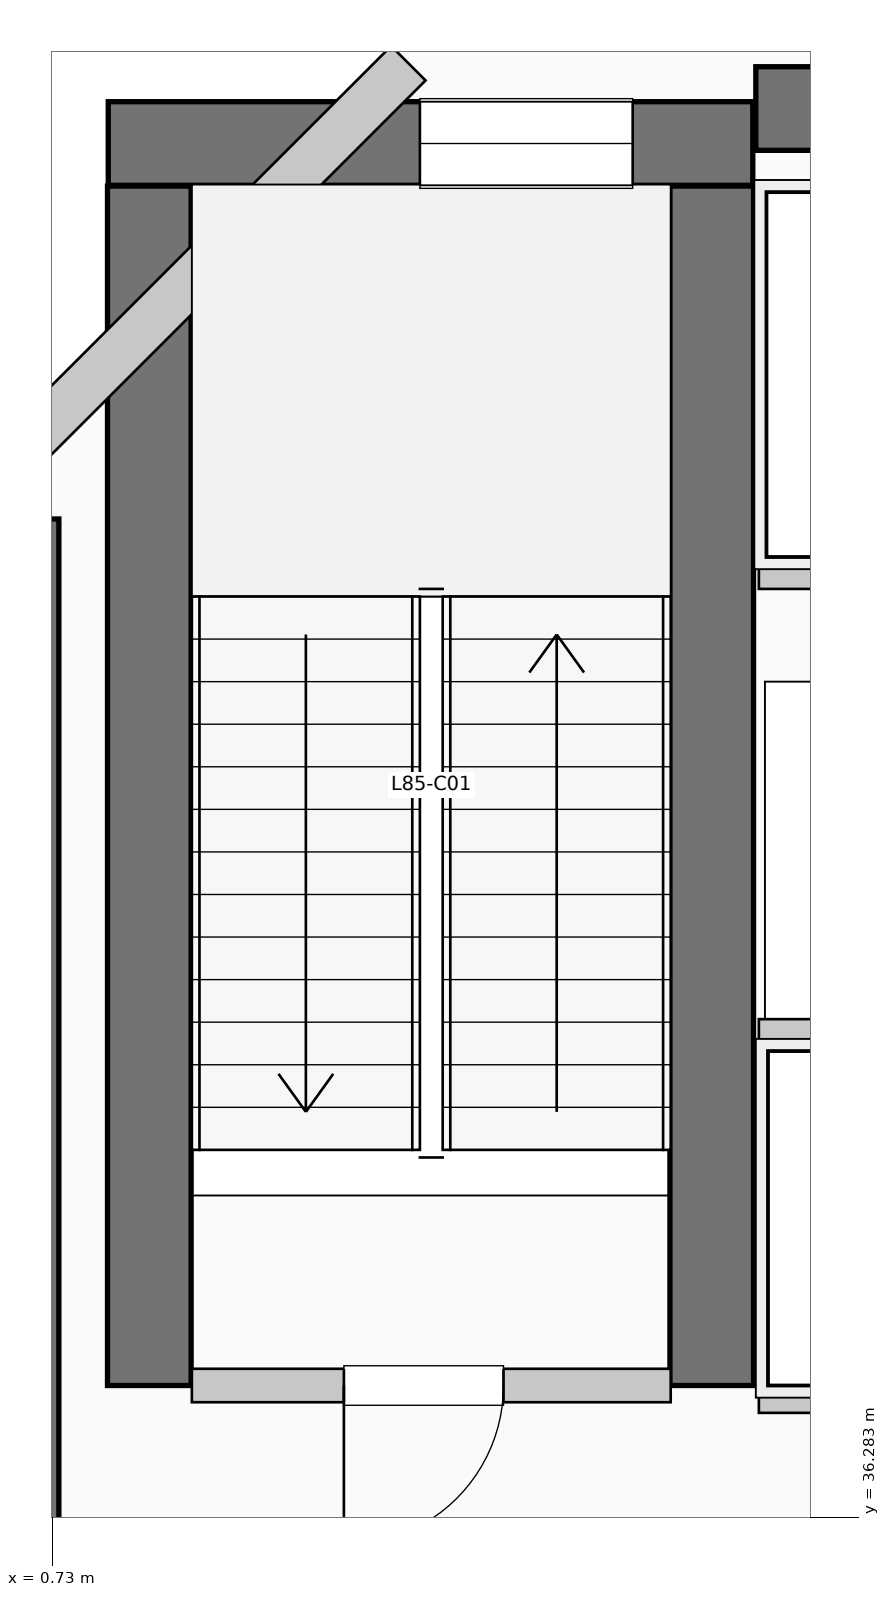
"""IFC4 building model, lengths in metres.
Left out: names, types, materials, properties, quantities, classifications, styles, units other than length and angle.
Written with IfcOpenShell. Run it as: python <this file> out.ifc"""

import sys

from ifc_helpers import new_model, si_unit, direction, frame, frame_2d, origin, place, context, subcontext, project, spatial, rectangle, extrude, element, fill, save


model = new_model("IFC4")
c1 = context("Model", 3, precision=1e-05, world=origin(), true_north=direction((0.0, 1.0)))
c2 = subcontext(c1, "Body", "Model", "MODEL_VIEW")
j1 = project(units=[si_unit("LENGTHUNIT", "METRE"), si_unit("PLANEANGLEUNIT", "RADIAN")], contexts=[c1])
p1 = place(None, origin())
s1 = spatial("IfcSite", under=j1, at=p1, CompositionType="ELEMENT")
p2 = place(p1, origin())
s2 = spatial("IfcBuilding", under=s1, at=p2, CompositionType="ELEMENT")
p3 = place(p2, frame((0.0, 0.0, 347.49)))
s3 = spatial("IfcBuildingStorey", under=s2, at=p3, CompositionType="ELEMENT", Elevation=347.49)
p4 = place(p3, frame((5.36, 45.55, 0.0), z_axis=(0.0, 0.0, 1.0), x_axis=(1.0, 0.0, 0.0)))
e1 = element("IfcWall", 1, at=p4, inside=s3, PredefinedType="SHEAR", context=c2, shape_type="SweptSolid", body=[
    extrude(rectangle(XDim=13.98, YDim=0.55, at=frame_2d((6.99, 0.0))), origin(), (0.0, 0.0, 1.0), 4.62),
])
p5 = place(p3, frame((0.5, 34.95, 0.0), z_axis=(0.0, 0.0, 1.0), x_axis=(0.0, 1.0, 0.0)))
e2 = element("IfcWall", 2, at=p5, inside=s3, PredefinedType="SHEAR", context=c2, shape_type="SweptSolid", body=[
    extrude(rectangle(XDim=7.9, YDim=0.55, at=frame_2d((3.95, 0.0))), origin(), (0.0, 0.0, 1.0), 4.62),
])
for number, where, z_axis, x_axis in (
    (3, (1.37, 37.15, 0.0), (0.0, 0.0, 1.0), (0.0, 1.0, 0.0)),
    (4, (5.07, 37.15, 0.0), (0.0, 0.0, 1.0), (0.0, 1.0, 0.0)),
):
    element("IfcWall", number, at=place(p3, frame(where, z_axis=z_axis, x_axis=x_axis)), inside=s3, PredefinedType="SHEAR", context=c2, shape_type="SweptSolid", body=[
        extrude(rectangle(XDim=7.89, YDim=0.55, at=frame_2d((3.945, 0.0))), origin(), (0.0, 0.0, 1.0), 4.62),
    ])
p6 = place(p3, frame((1.1, 45.32, 0.0), z_axis=(0.0, 0.0, 1.0), x_axis=(1.0, 0.0, 0.0)))
e5 = element("IfcWall", 5, at=p6, inside=s3, PredefinedType="SHEAR", context=c2, shape_type="SweptSolid", body=[
    extrude(rectangle(XDim=4.24, YDim=0.55, at=frame_2d((2.12, 0.0))), origin(), (0.0, 0.0, 1.0), 4.62),
])
p7 = place(p6, frame((2.05, 0.0, 1.05)))
e6 = element("IfcOpeningElement", 6, at=p7, cuts=e5, PredefinedType="OPENING", context=c2, shape_type="SweptSolid", body=[
    extrude(rectangle(XDim=1.4, YDim=1.8, at=frame_2d((0.7, 0.9))), frame((0.0, 0.285, 0.0), z_axis=(0.0, -1.0, 0.0), x_axis=(1.0, 0.0, 0.0)), (0.0, 0.0, 1.0), 0.57),
])
p8 = place(p3, frame((3.074, 45.848, 0.0), z_axis=(0.0, 0.0, 1.0), x_axis=(-0.707106781187, -0.707106781187, 0.0)))
e7 = element("IfcWall", 7, at=p8, inside=s3, PredefinedType="SOLIDWALL", context=c2, shape_type="SweptSolid", body=[
    extrude(rectangle(XDim=4.133, YDim=0.32, at=frame_2d((2.066, 0.0))), origin(), (0.0, 0.0, 1.0), 4.37),
])
p9 = place(p3, frame((1.65, 37.15, 0.0), z_axis=(0.0, 0.0, 1.0), x_axis=(1.0, 0.0, 0.0)))
e8 = element("IfcWall", 8, at=p9, inside=s3, PredefinedType="PARTITIONING", context=c2, shape_type="SweptSolid", body=[
    extrude(rectangle(XDim=3.15, YDim=0.22, at=frame_2d((1.575, 0.0))), origin(), (0.0, 0.0, 1.0), 4.37),
])
p10 = place(p9, frame((2.05, 0.0, 0.0), z_axis=(0.0, 0.0, 1.0), x_axis=(-1.0, 0.0, 0.0)))
e9 = element("IfcOpeningElement", 9, at=p10, cuts=e8, PredefinedType="OPENING", context=c2, shape_type="SweptSolid", body=[
    extrude(rectangle(XDim=1.05, YDim=2.15, at=frame_2d((0.525, 1.075))), frame((0.0, 0.12, 0.0), z_axis=(0.0, -1.0, 0.0), x_axis=(1.0, 0.0, 0.0)), (0.0, 0.0, 1.0), 0.24),
])
p11 = place(p3, frame((5.38, 37.08, 0.0), z_axis=(0.0, 0.0, 1.0), x_axis=(1.0, 0.0, 0.0)))
e10 = element("IfcWall", 10, at=p11, inside=s3, PredefinedType="PARTITIONING", context=c2, shape_type="SweptSolid", body=[
    extrude(rectangle(XDim=3.46, YDim=0.22, at=frame_2d((1.73, 0.0))), origin(), (0.0, 0.0, 1.0), 4.37),
])
p12 = place(p11, frame((1.55, 0.0, 0.0), z_axis=(0.0, 0.0, 1.0), x_axis=(-1.0, 0.0, 0.0)))
e11 = element("IfcOpeningElement", 11, at=p12, cuts=e10, PredefinedType="OPENING", context=c2, shape_type="SweptSolid", body=[
    extrude(rectangle(XDim=1.2, YDim=2.2, at=frame_2d((0.6, 1.1))), frame((0.0, 0.12, 0.0), z_axis=(0.0, -1.0, 0.0), x_axis=(1.0, 0.0, 0.0)), (0.0, 0.0, 1.0), 0.24),
])
p13 = place(p11, frame((3.22, 0.0, 0.0), z_axis=(0.0, 0.0, 1.0), x_axis=(-1.0, 0.0, 0.0)))
e12 = element("IfcOpeningElement", 12, at=p13, cuts=e10, PredefinedType="OPENING", context=c2, shape_type="SweptSolid", body=[
    extrude(rectangle(XDim=1.2, YDim=2.2, at=frame_2d((0.6, 1.1))), frame((0.0, 0.12, 0.0), z_axis=(0.0, -1.0, 0.0), x_axis=(1.0, 0.0, 0.0)), (0.0, 0.0, 1.0), 0.24),
])
p14 = place(p3, frame((5.38, 39.45, 0.0), z_axis=(0.0, 0.0, 1.0), x_axis=(1.0, 0.0, 0.0)))
e13 = element("IfcWall", 13, at=p14, inside=s3, PredefinedType="PARTITIONING", context=c2, shape_type="SweptSolid", body=[
    extrude(rectangle(XDim=3.46, YDim=0.22, at=frame_2d((1.73, 0.0))), origin(), (0.0, 0.0, 1.0), 4.37),
])
p15 = place(p3, frame((5.38, 42.5, 0.0), z_axis=(0.0, 0.0, 1.0), x_axis=(1.0, 0.0, 0.0)))
e14 = element("IfcWall", 14, at=p15, inside=s3, PredefinedType="PARTITIONING", context=c2, shape_type="SweptSolid", body=[
    extrude(rectangle(XDim=3.77, YDim=0.22, at=frame_2d((1.885, 0.0))), origin(), (0.0, 0.0, 1.0), 4.37),
])
p16 = place(p15, frame((1.75, 0.0, 0.0), z_axis=(0.0, 0.0, 1.0), x_axis=(-1.0, 0.0, 0.0)))
e15 = element("IfcOpeningElement", 15, at=p16, cuts=e14, PredefinedType="OPENING", context=c2, shape_type="SweptSolid", body=[
    extrude(rectangle(XDim=1.4, YDim=2.2, at=frame_2d((0.7, 1.1))), frame((0.0, 0.12, 0.0), z_axis=(0.0, -1.0, 0.0), x_axis=(1.0, 0.0, 0.0)), (0.0, 0.0, 1.0), 0.24),
])
p17 = place(p15, frame((3.53, 0.0, 0.0), z_axis=(0.0, 0.0, 1.0), x_axis=(-1.0, 0.0, 0.0)))
e16 = element("IfcOpeningElement", 16, at=p17, cuts=e14, PredefinedType="OPENING", context=c2, shape_type="SweptSolid", body=[
    extrude(rectangle(XDim=1.4, YDim=2.2, at=frame_2d((0.7, 1.1))), frame((0.0, 0.12, 0.0), z_axis=(0.0, -1.0, 0.0), x_axis=(1.0, 0.0, 0.0)), (0.0, 0.0, 1.0), 0.24),
])
p18 = place(p7, origin())
e17 = element("IfcWindow", 17, at=p18, inside=s3, PartitioningType="SINGLE_PANEL", PredefinedType="WINDOW", context=c2, shape_type="SweptSolid", body=[
    extrude(rectangle(XDim=1.4, YDim=1.8, at=frame_2d((0.7, 0.9))), frame((0.0, 0.03, 0.0), z_axis=(0.0, -1.0, 0.0), x_axis=(1.0, 0.0, 0.0)), (0.0, 0.0, 1.0), 0.06),
])
fill(e6, e17)
p19 = place(p10, origin())
e18 = element("IfcDoor", 18, at=p19, inside=s3, OperationType="SINGLE_SWING_LEFT", PredefinedType="DOOR", context=c2, shape_type="SweptSolid", body=[
    extrude(rectangle(XDim=1.05, YDim=2.15, at=frame_2d((0.525, 1.075))), frame((0.0, 0.025, 0.0), z_axis=(0.0, -1.0, 0.0), x_axis=(1.0, 0.0, 0.0)), (0.0, 0.0, 1.0), 0.05),
])
fill(e9, e18)
save(model, sys.argv[1])
